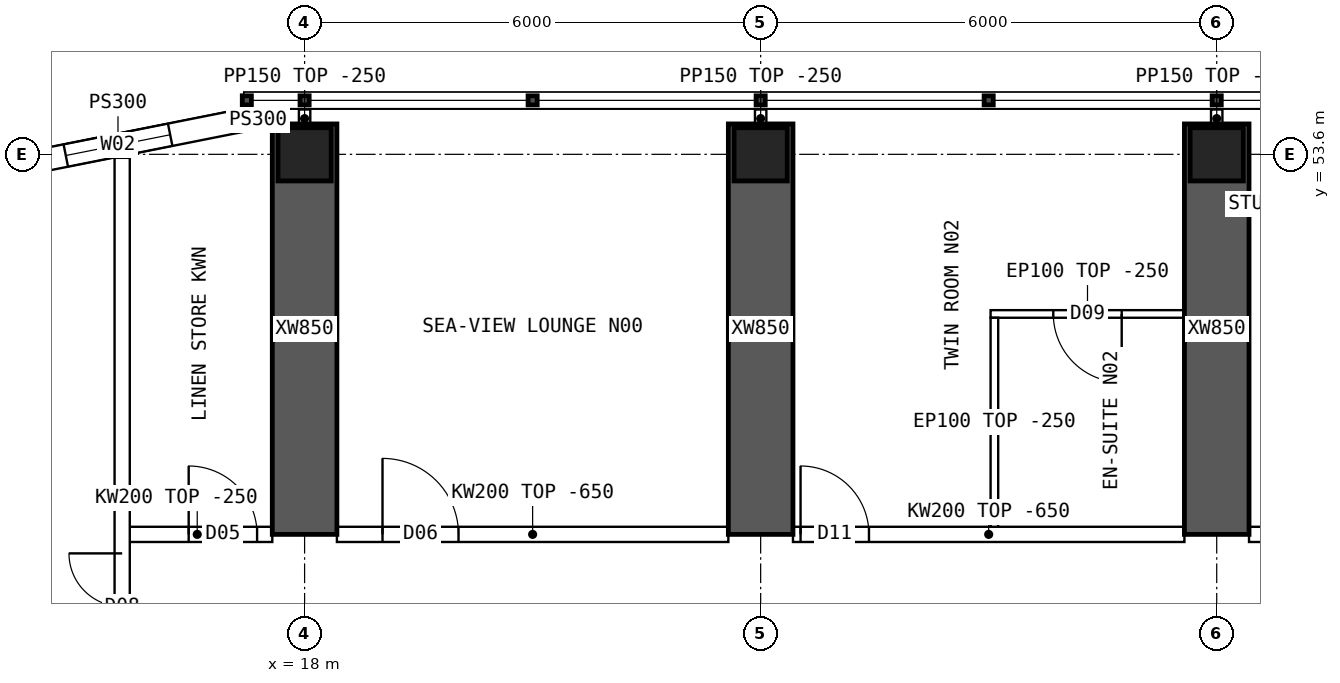
"""IFC4 building model, lengths in metres.
Left out: names, types, materials, properties, quantities, classifications, styles, units other than length and angle.
Written with IfcOpenShell. Run it as: python <this file> out.ifc"""

import sys

from ifc_helpers import new_model, si_unit, direction, frame, frame_2d, origin, origin_2d, place, context, subcontext, project, spatial, polyline, rectangle, hollow_rectangle, outline, extrude, element, fill, save


model = new_model("IFC4")
c1 = context("Model", 3, precision=1e-05, world=origin(), true_north=direction((0.0, 1.0)))
c2 = subcontext(c1, "Body", "Model", "MODEL_VIEW")
j1 = project(units=[si_unit("LENGTHUNIT", "METRE"), si_unit("PLANEANGLEUNIT", "RADIAN")], contexts=[c1])
p1 = place(None, origin())
s1 = spatial("IfcSite", under=j1, at=p1, CompositionType="ELEMENT")
p2 = place(p1, origin())
s2 = spatial("IfcBuilding", under=s1, at=p2, CompositionType="ELEMENT")
p3 = place(p2, frame((0.0, 0.0, 167.35)))
s3 = spatial("IfcBuildingStorey", under=s2, at=p3, CompositionType="ELEMENT", Elevation=167.35)
for number, where, z_axis, x_axis in (
    (1, (18.0, 53.6, 0.0), (0.0, 0.0, 1.0), (1.0, 0.0, 0.0)),
    (2, (24.0, 53.6, 0.0), (0.0, 0.0, 1.0), (1.0, 0.0, 0.0)),
    (3, (30.0, 53.6, 0.0), (0.0, 0.0, 1.0), (1.0, 0.0, 0.0)),
):
    element("IfcColumn", number, at=place(p3, frame(where, z_axis=z_axis, x_axis=x_axis)), inside=s3, PredefinedType="COLUMN", context=c2, shape_type="SweptSolid", body=[
        extrude(hollow_rectangle(XDim=0.7, YDim=0.7, WallThickness=0.07, at=origin_2d()), origin(), (0.0, 0.0, 1.0), 3.75),
    ])
for number, where, z_axis, x_axis in (
    (4, (18.0, 48.6, 0.0), (0.0, 0.0, 1.0), (0.0, 1.0, 0.0)),
    (5, (24.0, 48.6, 0.0), (0.0, 0.0, 1.0), (0.0, 1.0, 0.0)),
    (6, (30.0, 48.6, 0.0), (0.0, 0.0, 1.0), (0.0, 1.0, 0.0)),
):
    element("IfcWall", number, at=place(p3, frame(where, z_axis=z_axis, x_axis=x_axis)), inside=s3, PredefinedType="SHEAR", context=c2, shape_type="SweptSolid", body=[
        extrude(rectangle(XDim=5.4, YDim=0.85, at=frame_2d((2.7, 0.0))), origin(), (0.0, 0.0, 1.0), 3.75),
    ])
p4 = place(p3, frame((17.2, 54.05, 0.0), z_axis=(0.0, 0.0, 1.0), x_axis=(-0.98078325777, -0.195100490205, 0.0)))
e7 = element("IfcWall", 7, at=p4, inside=s3, PredefinedType="SOLIDWALL", context=c2, shape_type="SweptSolid", body=[
    extrude(outline(polyline([(-0.03, -0.15), (3.405, -0.15), (3.345, 0.15), (0.03, 0.15), (-0.03, -0.15)])), origin(), (0.0, 0.0, 1.0), 3.5),
])
p5 = place(p4, frame((0.988, 0.0, 0.9)))
e8 = element("IfcOpeningElement", 8, at=p5, cuts=e7, PredefinedType="OPENING", context=c2, shape_type="SweptSolid", body=[
    extrude(rectangle(XDim=1.4, YDim=1.8, at=frame_2d((0.7, 0.9))), frame((0.0, 0.16, 0.0), z_axis=(0.0, -1.0, 0.0), x_axis=(1.0, 0.0, 0.0)), (0.0, 0.0, 1.0), 0.32),
])
p6 = place(p3, frame((17.2, 54.05, 0.0), z_axis=(0.0, 0.0, 1.0), x_axis=(1.0, 0.0, 0.0)))
e9 = element("IfcWall", 9, at=p6, inside=s3, PredefinedType="SOLIDWALL", context=c2, shape_type="SweptSolid", body=[
    extrude(rectangle(XDim=0.375, YDim=0.3, at=frame_2d((0.188, 0.0))), origin(), (0.0, 0.0, 1.0), 3.5),
])
p7 = place(p3, frame((15.6, 48.6, 0.0), z_axis=(0.0, 0.0, 1.0), x_axis=(1.0, 0.0, 0.0)))
e10 = element("IfcWall", 10, at=p7, inside=s3, PredefinedType="SOLIDWALL", context=c2, shape_type="SweptSolid", body=[
    extrude(rectangle(XDim=1.975, YDim=0.2, at=frame_2d((0.987, 0.0))), origin(), (0.0, 0.0, 1.0), 3.5),
])
p8 = place(p7, frame((0.875, 0.0, 0.0)))
e11 = element("IfcOpeningElement", 11, at=p8, cuts=e10, PredefinedType="OPENING", context=c2, shape_type="SweptSolid", body=[
    extrude(rectangle(XDim=0.9, YDim=2.1, at=frame_2d((0.45, 1.05))), frame((0.0, 0.11, 0.0), z_axis=(0.0, -1.0, 0.0), x_axis=(1.0, 0.0, 0.0)), (0.0, 0.0, 1.0), 0.22),
])
p9 = place(p3, frame((18.425, 48.6, 0.0), z_axis=(0.0, 0.0, 1.0), x_axis=(1.0, 0.0, 0.0)))
e12 = element("IfcWall", 12, at=p9, inside=s3, PredefinedType="SOLIDWALL", context=c2, shape_type="SweptSolid", body=[
    extrude(outline(polyline([(0.0, 0.0), (5.15, 0.0), (5.15, 3.1), (0.0, 3.1), (0.0, 0.0)])), frame((0.0, 0.1, 0.0), z_axis=(0.0, -1.0, 0.0), x_axis=(1.0, 0.0, 0.0)), (0.0, 0.0, 1.0), 0.2),
])
p10 = place(p9, frame((0.6, 0.0, 0.0)))
e13 = element("IfcOpeningElement", 13, at=p10, cuts=e12, PredefinedType="OPENING", context=c2, shape_type="SweptSolid", body=[
    extrude(rectangle(XDim=1.0, YDim=2.1, at=frame_2d((0.5, 1.05))), frame((0.0, 0.11, 0.0), z_axis=(0.0, -1.0, 0.0), x_axis=(1.0, 0.0, 0.0)), (0.0, 0.0, 1.0), 0.22),
])
p11 = place(p3, frame((24.425, 48.6, 0.0), z_axis=(0.0, 0.0, 1.0), x_axis=(1.0, 0.0, 0.0)))
e14 = element("IfcWall", 14, at=p11, inside=s3, PredefinedType="SOLIDWALL", context=c2, shape_type="SweptSolid", body=[
    extrude(outline(polyline([(0.0, 0.0), (5.15, 0.0), (5.15, 3.1), (0.0, 3.1), (0.0, 0.0)])), frame((0.0, 0.1, 0.0), z_axis=(0.0, -1.0, 0.0), x_axis=(1.0, 0.0, 0.0)), (0.0, 0.0, 1.0), 0.2),
])
p12 = place(p11, frame((0.1, 0.0, 0.0)))
e15 = element("IfcOpeningElement", 15, at=p12, cuts=e14, PredefinedType="OPENING", context=c2, shape_type="SweptSolid", body=[
    extrude(rectangle(XDim=0.9, YDim=2.1, at=frame_2d((0.45, 1.05))), frame((0.0, 0.11, 0.0), z_axis=(0.0, -1.0, 0.0), x_axis=(1.0, 0.0, 0.0)), (0.0, 0.0, 1.0), 0.22),
])
p13 = place(p3, frame((30.425, 48.6, 0.0), z_axis=(0.0, 0.0, 1.0), x_axis=(1.0, 0.0, 0.0)))
e16 = element("IfcWall", 16, at=p13, inside=s3, PredefinedType="SOLIDWALL", context=c2, shape_type="SweptSolid", body=[
    extrude(outline(polyline([(0.0, 0.0), (5.15, 0.0), (5.15, 3.1), (0.0, 3.1), (0.0, 0.0)])), frame((0.0, 0.1, 0.0), z_axis=(0.0, -1.0, 0.0), x_axis=(1.0, 0.0, 0.0)), (0.0, 0.0, 1.0), 0.2),
])
p14 = place(p13, frame((2.3, 0.0, 0.0)))
e17 = element("IfcOpeningElement", 17, at=p14, cuts=e16, PredefinedType="OPENING", context=c2, shape_type="SweptSolid", body=[
    extrude(rectangle(XDim=0.9, YDim=2.1, at=frame_2d((0.45, 1.05))), frame((0.0, 0.11, 0.0), z_axis=(0.0, -1.0, 0.0), x_axis=(1.0, 0.0, 0.0)), (0.0, 0.0, 1.0), 0.22),
])
p15 = place(p3, frame((27.025, 51.5, 0.0), z_axis=(0.0, 0.0, 1.0), x_axis=(1.0, 0.0, 0.0)))
e18 = element("IfcWall", 18, at=p15, inside=s3, PredefinedType="PARTITIONING", context=c2, shape_type="SweptSolid", body=[
    extrude(rectangle(XDim=2.55, YDim=0.1, at=frame_2d((1.275, 0.0))), origin(), (0.0, 0.0, 1.0), 3.5),
])
p16 = place(p15, frame((0.825, 0.0, 0.0)))
e19 = element("IfcOpeningElement", 19, at=p16, cuts=e18, PredefinedType="OPENING", context=c2, shape_type="SweptSolid", body=[
    extrude(rectangle(XDim=0.9, YDim=2.1, at=frame_2d((0.45, 1.05))), frame((0.0, 0.06, 0.0), z_axis=(0.0, -1.0, 0.0), x_axis=(1.0, 0.0, 0.0)), (0.0, 0.0, 1.0), 0.12),
])
p17 = place(p3, frame((27.075, 51.45, 0.0), z_axis=(0.0, 0.0, 1.0), x_axis=(0.0, -1.0, 0.0)))
e20 = element("IfcWall", 20, at=p17, inside=s3, PredefinedType="PARTITIONING", context=c2, shape_type="SweptSolid", body=[
    extrude(outline(polyline([(0.0, 0.0), (2.75, 0.0), (2.75, 3.1), (2.702, 3.1), (2.7, 3.5), (0.0, 3.5), (0.0, 0.0)])), frame((0.0, 0.05, 0.0), z_axis=(0.0, -1.0, 0.0), x_axis=(1.0, 0.0, 0.0)), (0.0, 0.0, 1.0), 0.1),
])
p18 = place(p3, frame((15.6, 10.446, 0.0), z_axis=(0.0, 0.0, 1.0), x_axis=(0.0, 1.0, 0.0)))
e21 = element("IfcWall", 21, at=p18, inside=s3, PredefinedType="SOLIDWALL", context=c2, shape_type="SweptSolid", body=[
    extrude(rectangle(XDim=43.107, YDim=0.2, at=frame_2d((21.554, 0.0))), origin(), (0.0, 0.0, 1.0), 3.5),
])
p19 = place(p18, frame((13.914, 0.0, 0.0)))
e22 = element("IfcOpeningElement", 22, at=p19, cuts=e21, PredefinedType="OPENING", context=c2, shape_type="SweptSolid", body=[
    extrude(rectangle(XDim=1.2, YDim=2.1, at=frame_2d((0.6, 1.05))), frame((0.0, 0.11, 0.0), z_axis=(0.0, -1.0, 0.0), x_axis=(1.0, 0.0, 0.0)), (0.0, 0.0, 1.0), 0.22),
])
p20 = place(p18, frame((5.104, 0.0, 0.0)))
e23 = element("IfcOpeningElement", 23, at=p20, cuts=e21, PredefinedType="OPENING", context=c2, shape_type="SweptSolid", body=[
    extrude(rectangle(XDim=1.4, YDim=2.1, at=frame_2d((0.7, 1.05))), frame((0.0, 0.11, 0.0), z_axis=(0.0, -1.0, 0.0), x_axis=(1.0, 0.0, 0.0)), (0.0, 0.0, 1.0), 0.22),
])
p21 = place(p18, frame((36.504, 0.0, 0.0)))
e24 = element("IfcOpeningElement", 24, at=p21, cuts=e21, PredefinedType="OPENING", context=c2, shape_type="SweptSolid", body=[
    extrude(rectangle(XDim=1.4, YDim=2.1, at=frame_2d((0.7, 1.05))), frame((0.0, 0.11, 0.0), z_axis=(0.0, -1.0, 0.0), x_axis=(1.0, 0.0, 0.0)), (0.0, 0.0, 1.0), 0.22),
])
for number, where, z_axis, x_axis in (
    (25, (18.0, 53.95, 0.0), (0.0, 0.0, 1.0), (0.0, 1.0, 0.0)),
    (26, (24.0, 53.95, 0.0), (0.0, 0.0, 1.0), (0.0, 1.0, 0.0)),
    (27, (30.0, 53.95, 0.0), (0.0, 0.0, 1.0), (0.0, 1.0, 0.0)),
):
    element("IfcWall", number, at=place(p3, frame(where, z_axis=z_axis, x_axis=x_axis)), inside=s3, PredefinedType="PARTITIONING", context=c2, shape_type="SweptSolid", body=[
        extrude(rectangle(XDim=0.24, YDim=0.15, at=frame_2d((0.12, 0.0))), origin(), (0.0, 0.0, 1.0), 3.5),
    ])
p22 = place(p5, origin())
e28 = element("IfcWindow", 28, at=p22, inside=s3, PartitioningType="SINGLE_PANEL", PredefinedType="WINDOW", context=c2, shape_type="SweptSolid", body=[
    extrude(rectangle(XDim=1.4, YDim=1.8, at=frame_2d((0.7, 0.9))), frame((0.0, 0.03, 0.0), z_axis=(0.0, -1.0, 0.0), x_axis=(1.0, 0.0, 0.0)), (0.0, 0.0, 1.0), 0.06),
])
fill(e8, e28)
p23 = place(p10, origin())
e29 = element("IfcDoor", 29, at=p23, inside=s3, OperationType="SINGLE_SWING_LEFT", PredefinedType="DOOR", context=c2, shape_type="SweptSolid", body=[
    extrude(rectangle(XDim=1.0, YDim=2.1, at=frame_2d((0.5, 1.05))), frame((0.0, 0.025, 0.0), z_axis=(0.0, -1.0, 0.0), x_axis=(1.0, 0.0, 0.0)), (0.0, 0.0, 1.0), 0.05),
])
fill(e13, e29)
p24 = place(p16, origin())
e30 = element("IfcDoor", 30, at=p24, inside=s3, OperationType="SINGLE_SWING_RIGHT", PredefinedType="DOOR", context=c2, shape_type="SweptSolid", body=[
    extrude(rectangle(XDim=0.9, YDim=2.1, at=frame_2d((0.45, 1.05))), frame((0.0, 0.025, 0.0), z_axis=(0.0, -1.0, 0.0), x_axis=(1.0, 0.0, 0.0)), (0.0, 0.0, 1.0), 0.05),
])
fill(e19, e30)
p25 = place(p12, origin())
e31 = element("IfcDoor", 31, at=p25, inside=s3, OperationType="SINGLE_SWING_LEFT", PredefinedType="DOOR", context=c2, shape_type="SweptSolid", body=[
    extrude(rectangle(XDim=0.9, YDim=2.1, at=frame_2d((0.45, 1.05))), frame((0.0, 0.025, 0.0), z_axis=(0.0, -1.0, 0.0), x_axis=(1.0, 0.0, 0.0)), (0.0, 0.0, 1.0), 0.05),
])
fill(e15, e31)
p26 = place(p21, origin())
e32 = element("IfcDoor", 32, at=p26, inside=s3, OperationType="DOUBLE_DOOR_SINGLE_SWING", PredefinedType="DOOR", context=c2, shape_type="SweptSolid", body=[
    extrude(rectangle(XDim=1.4, YDim=2.1, at=frame_2d((0.7, 1.05))), frame((0.0, 0.025, 0.0), z_axis=(0.0, -1.0, 0.0), x_axis=(1.0, 0.0, 0.0)), (0.0, 0.0, 1.0), 0.05),
])
fill(e24, e32)
p27 = place(p8, origin())
e33 = element("IfcDoor", 33, at=p27, inside=s3, OperationType="SINGLE_SWING_LEFT", PredefinedType="DOOR", context=c2, shape_type="SweptSolid", body=[
    extrude(rectangle(XDim=0.9, YDim=2.1, at=frame_2d((0.45, 1.05))), frame((0.0, 0.025, 0.0), z_axis=(0.0, -1.0, 0.0), x_axis=(1.0, 0.0, 0.0)), (0.0, 0.0, 1.0), 0.05),
])
fill(e11, e33)
save(model, sys.argv[1])
